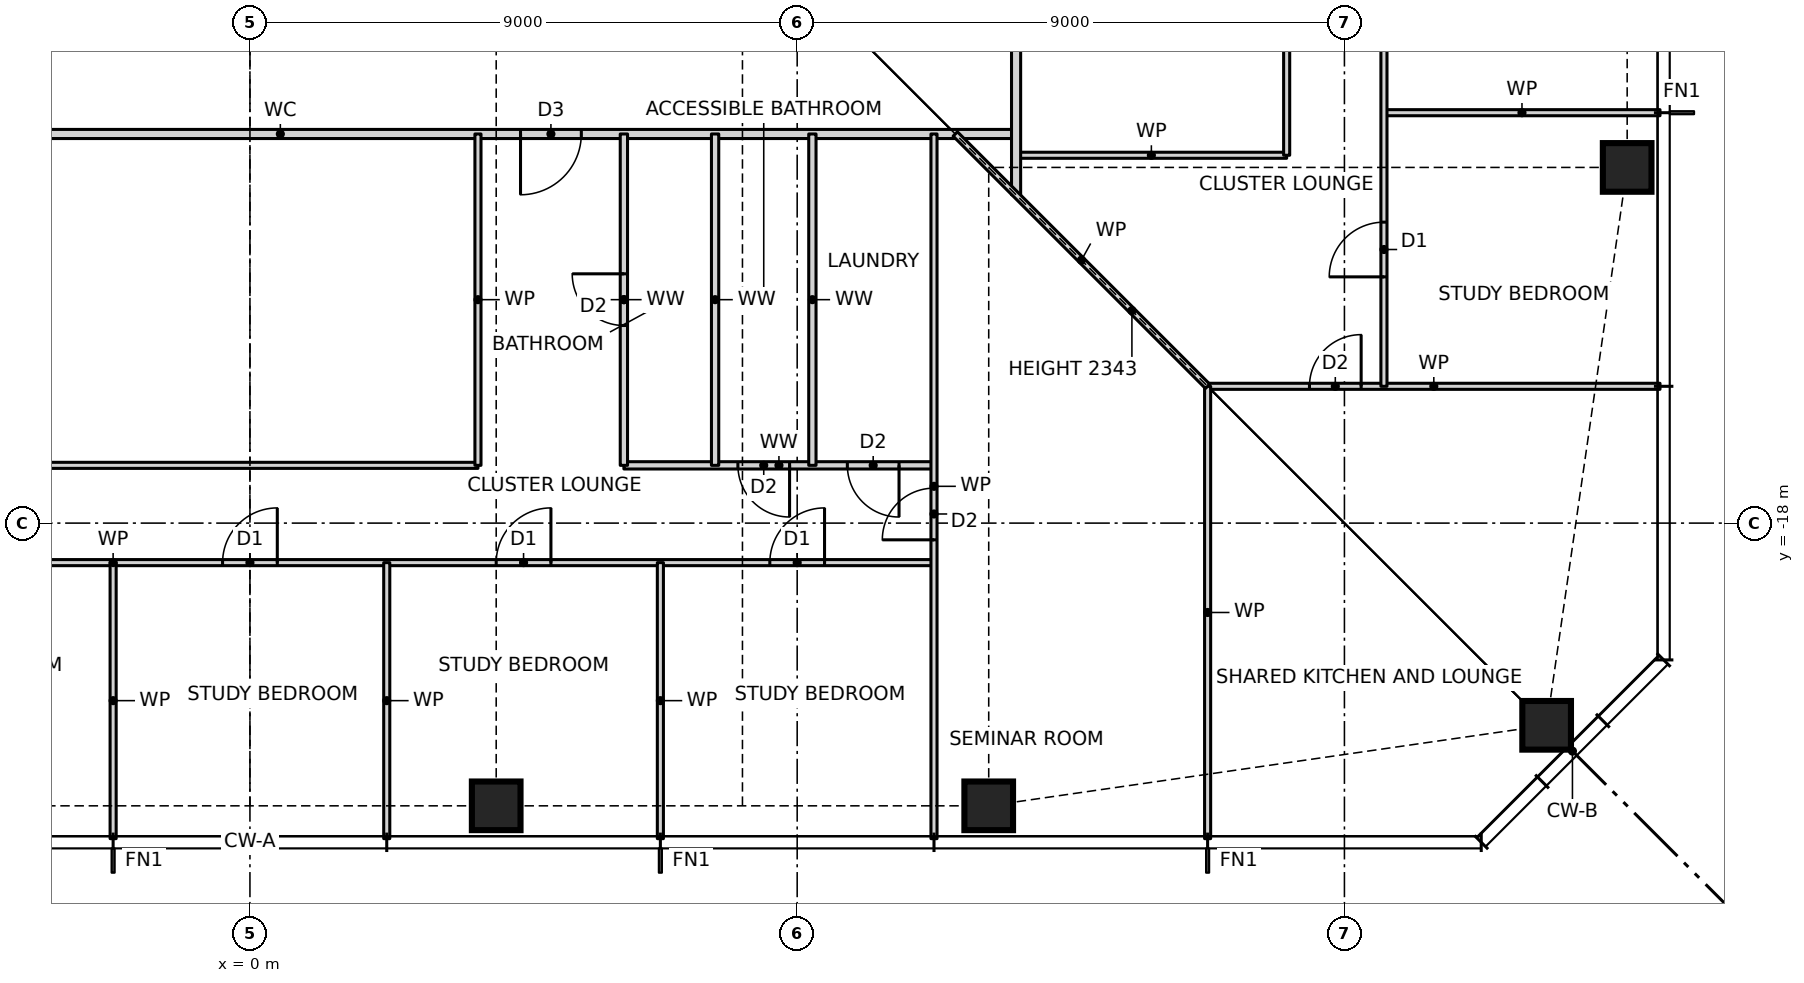
"""IFC4 building model, lengths in metres.
Left out: names, types, materials, properties, quantities, classifications, styles, units other than length and angle.
Written with IfcOpenShell. Run it as: python <this file> out.ifc"""

import sys

from ifc_helpers import new_model, si_unit, direction, frame, frame_2d, origin, origin_2d, place, context, subcontext, project, spatial, rectangle, hollow_rectangle, extrude, element, fill, save


model = new_model("IFC4")
c1 = context("Model", 3, precision=1e-05, world=origin(), true_north=direction((0.0, 1.0)))
c2 = subcontext(c1, "Body", "Model", "MODEL_VIEW")
j1 = project(units=[si_unit("LENGTHUNIT", "METRE"), si_unit("PLANEANGLEUNIT", "RADIAN")], contexts=[c1])
p1 = place(None, origin())
s1 = spatial("IfcSite", under=j1, at=p1, CompositionType="ELEMENT")
p2 = place(p1, origin())
s2 = spatial("IfcBuilding", under=s1, at=p2, CompositionType="ELEMENT")
p3 = place(p2, frame((0.0, 0.0, 25.5)))
s3 = spatial("IfcBuildingStorey", under=s2, at=p3, CompositionType="ELEMENT", Elevation=25.5)
for number, where, z_axis, x_axis in (
    (1, (4.05, -22.65, 0.0), (0.0, 0.0, 1.0), (1.0, 0.0, 0.0)),
    (2, (12.15, -22.65, 0.0), (0.0, 0.0, 1.0), (1.0, 0.0, 0.0)),
    (3, (21.326, -21.326, 0.0), (0.0, 0.0, 1.0), (1.0, 0.0, 0.0)),
    (4, (22.65, -12.15, 0.0), (0.0, 0.0, 1.0), (1.0, 0.0, 0.0)),
):
    element("IfcColumn", number, at=place(p3, frame(where, z_axis=z_axis, x_axis=x_axis)), inside=s3, PredefinedType="COLUMN", context=c2, shape_type="SweptSolid", body=[
        extrude(hollow_rectangle(XDim=0.8, YDim=0.8, WallThickness=0.09, at=origin_2d()), origin(), (0.0, 0.0, 1.0), 3.5),
    ])
p4 = place(p3, frame((-15.75, -18.65, 0.0), z_axis=(0.0, 0.0, 1.0), x_axis=(1.0, 0.0, 0.0)))
e5 = element("IfcWall", 5, at=p4, inside=s3, PredefinedType="PARTITIONING", context=c2, shape_type="SweptSolid", body=[
    extrude(rectangle(XDim=27.0, YDim=0.1, at=frame_2d((13.5, 0.0))), origin(), (0.0, 0.0, 1.0), 3.27),
])
p5 = place(p4, frame((1.8, 0.0, 0.0)))
e6 = element("IfcOpeningElement", 6, at=p5, cuts=e5, PredefinedType="OPENING", context=c2, shape_type="SweptSolid", body=[
    extrude(rectangle(XDim=0.9, YDim=2.1, at=frame_2d((0.45, 1.05))), frame((0.0, 0.06, 0.0), z_axis=(0.0, -1.0, 0.0), x_axis=(1.0, 0.0, 0.0)), (0.0, 0.0, 1.0), 0.12),
])
p6 = place(p4, frame((6.3, 0.0, 0.0)))
e7 = element("IfcOpeningElement", 7, at=p6, cuts=e5, PredefinedType="OPENING", context=c2, shape_type="SweptSolid", body=[
    extrude(rectangle(XDim=0.9, YDim=2.1, at=frame_2d((0.45, 1.05))), frame((0.0, 0.06, 0.0), z_axis=(0.0, -1.0, 0.0), x_axis=(1.0, 0.0, 0.0)), (0.0, 0.0, 1.0), 0.12),
])
p7 = place(p4, frame((10.8, 0.0, 0.0)))
e8 = element("IfcOpeningElement", 8, at=p7, cuts=e5, PredefinedType="OPENING", context=c2, shape_type="SweptSolid", body=[
    extrude(rectangle(XDim=0.9, YDim=2.1, at=frame_2d((0.45, 1.05))), frame((0.0, 0.06, 0.0), z_axis=(0.0, -1.0, 0.0), x_axis=(1.0, 0.0, 0.0)), (0.0, 0.0, 1.0), 0.12),
])
p8 = place(p4, frame((15.3, 0.0, 0.0)))
e9 = element("IfcOpeningElement", 9, at=p8, cuts=e5, PredefinedType="OPENING", context=c2, shape_type="SweptSolid", body=[
    extrude(rectangle(XDim=0.9, YDim=2.1, at=frame_2d((0.45, 1.05))), frame((0.0, 0.06, 0.0), z_axis=(0.0, -1.0, 0.0), x_axis=(1.0, 0.0, 0.0)), (0.0, 0.0, 1.0), 0.12),
])
p9 = place(p4, frame((19.8, 0.0, 0.0)))
e10 = element("IfcOpeningElement", 10, at=p9, cuts=e5, PredefinedType="OPENING", context=c2, shape_type="SweptSolid", body=[
    extrude(rectangle(XDim=0.9, YDim=2.1, at=frame_2d((0.45, 1.05))), frame((0.0, 0.06, 0.0), z_axis=(0.0, -1.0, 0.0), x_axis=(1.0, 0.0, 0.0)), (0.0, 0.0, 1.0), 0.12),
])
p10 = place(p4, frame((24.3, 0.0, 0.0)))
e11 = element("IfcOpeningElement", 11, at=p10, cuts=e5, PredefinedType="OPENING", context=c2, shape_type="SweptSolid", body=[
    extrude(rectangle(XDim=0.9, YDim=2.1, at=frame_2d((0.45, 1.05))), frame((0.0, 0.06, 0.0), z_axis=(0.0, -1.0, 0.0), x_axis=(1.0, 0.0, 0.0)), (0.0, 0.0, 1.0), 0.12),
])
p11 = place(p3, frame((-11.76, -17.05, 0.0), z_axis=(0.0, 0.0, 1.0), x_axis=(1.0, 0.0, 0.0)))
e12 = element("IfcWall", 12, at=p11, inside=s3, PredefinedType="PARTITIONING", context=c2, shape_type="SweptSolid", body=[
    extrude(rectangle(XDim=15.51, YDim=0.1, at=frame_2d((7.755, 0.0))), origin(), (0.0, 0.0, 1.0), 3.27),
])
p12 = place(p11, frame((7.33, 0.0, 0.0)))
e13 = element("IfcOpeningElement", 13, at=p12, cuts=e12, PredefinedType="OPENING", context=c2, shape_type="SweptSolid", body=[
    extrude(rectangle(XDim=0.85, YDim=2.1, at=frame_2d((0.425, 1.05))), frame((0.0, 0.06, 0.0), z_axis=(0.0, -1.0, 0.0), x_axis=(1.0, 0.0, 0.0)), (0.0, 0.0, 1.0), 0.12),
])
p13 = place(p3, frame((6.15, -17.05, 0.0), z_axis=(0.0, 0.0, 1.0), x_axis=(1.0, 0.0, 0.0)))
e14 = element("IfcWall", 14, at=p13, inside=s3, PredefinedType="PARTITIONING", context=c2, shape_type="SweptSolid", body=[
    extrude(rectangle(XDim=5.1, YDim=0.12, at=frame_2d((2.55, 0.0))), origin(), (0.0, 0.0, 1.0), 3.27),
])
p14 = place(p13, frame((1.875, 0.0, 0.0)))
e15 = element("IfcOpeningElement", 15, at=p14, cuts=e14, PredefinedType="OPENING", context=c2, shape_type="SweptSolid", body=[
    extrude(rectangle(XDim=0.85, YDim=2.1, at=frame_2d((0.425, 1.05))), frame((0.0, 0.07, 0.0), z_axis=(0.0, -1.0, 0.0), x_axis=(1.0, 0.0, 0.0)), (0.0, 0.0, 1.0), 0.14),
])
p15 = place(p13, frame((3.675, 0.0, 0.0)))
e16 = element("IfcOpeningElement", 16, at=p15, cuts=e14, PredefinedType="OPENING", context=c2, shape_type="SweptSolid", body=[
    extrude(rectangle(XDim=0.85, YDim=2.1, at=frame_2d((0.425, 1.05))), frame((0.0, 0.07, 0.0), z_axis=(0.0, -1.0, 0.0), x_axis=(1.0, 0.0, 0.0)), (0.0, 0.0, 1.0), 0.14),
])
p16 = place(p3, frame((15.75, -15.75, 0.0), z_axis=(0.0, 0.0, 1.0), x_axis=(1.0, 0.0, 0.0)))
e17 = element("IfcWall", 17, at=p16, inside=s3, PredefinedType="PARTITIONING", context=c2, shape_type="SweptSolid", body=[
    extrude(rectangle(XDim=7.44, YDim=0.1, at=frame_2d((3.72, 0.0))), origin(), (0.0, 0.0, 1.0), 3.27),
])
p17 = place(p16, frame((1.675, 0.0, 0.0)))
e18 = element("IfcOpeningElement", 18, at=p17, cuts=e17, PredefinedType="OPENING", context=c2, shape_type="SweptSolid", body=[
    extrude(rectangle(XDim=0.85, YDim=2.1, at=frame_2d((0.425, 1.05))), frame((0.0, 0.06, 0.0), z_axis=(0.0, -1.0, 0.0), x_axis=(1.0, 0.0, 0.0)), (0.0, 0.0, 1.0), 0.12),
])
p18 = place(p3, frame((12.6, -11.95, 0.0), z_axis=(0.0, 0.0, 1.0), x_axis=(1.0, 0.0, 0.0)))
e19 = element("IfcWall", 19, at=p18, inside=s3, PredefinedType="PARTITIONING", context=c2, shape_type="SweptSolid", body=[
    extrude(rectangle(XDim=4.45, YDim=0.1, at=frame_2d((2.225, 0.0))), origin(), (0.0, 0.0, 1.0), 3.27),
])
p19 = place(p3, frame((-11.6, -11.6, 0.0), z_axis=(0.0, 0.0, 1.0), x_axis=(1.0, 0.0, 0.0)))
e20 = element("IfcWall", 20, at=p19, inside=s3, PredefinedType="PARTITIONING", context=c2, shape_type="SweptSolid", body=[
    extrude(rectangle(XDim=24.2, YDim=0.15, at=frame_2d((12.1, 0.0))), origin(), (0.0, 0.0, 1.0), 3.27),
])
p20 = place(p19, frame((16.05, 0.0, 0.0)))
e21 = element("IfcOpeningElement", 21, at=p20, cuts=e20, PredefinedType="OPENING", context=c2, shape_type="SweptSolid", body=[
    extrude(rectangle(XDim=1.0, YDim=2.1, at=frame_2d((0.5, 1.05))), frame((0.0, 0.085, 0.0), z_axis=(0.0, -1.0, 0.0), x_axis=(1.0, 0.0, 0.0)), (0.0, 0.0, 1.0), 0.17),
])
p21 = place(p3, frame((18.65, -11.25, 0.0), z_axis=(0.0, 0.0, 1.0), x_axis=(1.0, 0.0, 0.0)))
e22 = element("IfcWall", 22, at=p21, inside=s3, PredefinedType="PARTITIONING", context=c2, shape_type="SweptSolid", body=[
    extrude(rectangle(XDim=4.54, YDim=0.1, at=frame_2d((2.27, 0.0))), origin(), (0.0, 0.0, 1.0), 3.27),
])
p22 = place(p3, frame((18.65, -15.75, 0.0), z_axis=(0.0, 0.0, 1.0), x_axis=(0.0, 1.0, 0.0)))
e23 = element("IfcWall", 23, at=p22, inside=s3, PredefinedType="PARTITIONING", context=c2, shape_type="SweptSolid", body=[
    extrude(rectangle(XDim=31.5, YDim=0.1, at=frame_2d((15.75, 0.0))), origin(), (0.0, 0.0, 1.0), 3.27),
])
p23 = place(p22, frame((1.8, 0.0, 0.0)))
e24 = element("IfcOpeningElement", 24, at=p23, cuts=e23, PredefinedType="OPENING", context=c2, shape_type="SweptSolid", body=[
    extrude(rectangle(XDim=0.9, YDim=2.1, at=frame_2d((0.45, 1.05))), frame((0.0, 0.06, 0.0), z_axis=(0.0, -1.0, 0.0), x_axis=(1.0, 0.0, 0.0)), (0.0, 0.0, 1.0), 0.12),
])
p24 = place(p22, frame((6.3, 0.0, 0.0)))
e25 = element("IfcOpeningElement", 25, at=p24, cuts=e23, PredefinedType="OPENING", context=c2, shape_type="SweptSolid", body=[
    extrude(rectangle(XDim=0.9, YDim=2.1, at=frame_2d((0.45, 1.05))), frame((0.0, 0.06, 0.0), z_axis=(0.0, -1.0, 0.0), x_axis=(1.0, 0.0, 0.0)), (0.0, 0.0, 1.0), 0.12),
])
p25 = place(p22, frame((10.8, 0.0, 0.0)))
e26 = element("IfcOpeningElement", 26, at=p25, cuts=e23, PredefinedType="OPENING", context=c2, shape_type="SweptSolid", body=[
    extrude(rectangle(XDim=0.9, YDim=2.1, at=frame_2d((0.45, 1.05))), frame((0.0, 0.06, 0.0), z_axis=(0.0, -1.0, 0.0), x_axis=(1.0, 0.0, 0.0)), (0.0, 0.0, 1.0), 0.12),
])
p26 = place(p22, frame((15.3, 0.0, 0.0)))
e27 = element("IfcOpeningElement", 27, at=p26, cuts=e23, PredefinedType="OPENING", context=c2, shape_type="SweptSolid", body=[
    extrude(rectangle(XDim=0.9, YDim=2.1, at=frame_2d((0.45, 1.05))), frame((0.0, 0.06, 0.0), z_axis=(0.0, -1.0, 0.0), x_axis=(1.0, 0.0, 0.0)), (0.0, 0.0, 1.0), 0.12),
])
p27 = place(p22, frame((19.8, 0.0, 0.0)))
e28 = element("IfcOpeningElement", 28, at=p27, cuts=e23, PredefinedType="OPENING", context=c2, shape_type="SweptSolid", body=[
    extrude(rectangle(XDim=0.9, YDim=2.1, at=frame_2d((0.45, 1.05))), frame((0.0, 0.06, 0.0), z_axis=(0.0, -1.0, 0.0), x_axis=(1.0, 0.0, 0.0)), (0.0, 0.0, 1.0), 0.12),
])
p28 = place(p22, frame((24.3, 0.0, 0.0)))
e29 = element("IfcOpeningElement", 29, at=p28, cuts=e23, PredefinedType="OPENING", context=c2, shape_type="SweptSolid", body=[
    extrude(rectangle(XDim=0.9, YDim=2.1, at=frame_2d((0.45, 1.05))), frame((0.0, 0.06, 0.0), z_axis=(0.0, -1.0, 0.0), x_axis=(1.0, 0.0, 0.0)), (0.0, 0.0, 1.0), 0.12),
])
p29 = place(p22, frame((28.8, 0.0, 0.0)))
e30 = element("IfcOpeningElement", 30, at=p29, cuts=e23, PredefinedType="OPENING", context=c2, shape_type="SweptSolid", body=[
    extrude(rectangle(XDim=0.9, YDim=2.1, at=frame_2d((0.45, 1.05))), frame((0.0, 0.06, 0.0), z_axis=(0.0, -1.0, 0.0), x_axis=(1.0, 0.0, 0.0)), (0.0, 0.0, 1.0), 0.12),
])
p30 = place(p3, frame((17.05, -11.95, 0.0), z_axis=(0.0, 0.0, 1.0), x_axis=(0.0, 1.0, 0.0)))
e31 = element("IfcWall", 31, at=p30, inside=s3, PredefinedType="PARTITIONING", context=c2, shape_type="SweptSolid", body=[
    extrude(rectangle(XDim=20.2, YDim=0.1, at=frame_2d((10.1, 0.0))), origin(), (0.0, 0.0, 1.0), 3.27),
])
p31 = place(p30, frame((9.675, 0.0, 0.0)))
e32 = element("IfcOpeningElement", 32, at=p31, cuts=e31, PredefinedType="OPENING", context=c2, shape_type="SweptSolid", body=[
    extrude(rectangle(XDim=0.85, YDim=2.1, at=frame_2d((0.425, 1.05))), frame((0.0, 0.06, 0.0), z_axis=(0.0, -1.0, 0.0), x_axis=(1.0, 0.0, 0.0)), (0.0, 0.0, 1.0), 0.12),
])
p32 = place(p3, frame((15.75, -23.19, 0.0), z_axis=(0.0, 0.0, 1.0), x_axis=(0.0, 1.0, 0.0)))
e33 = element("IfcWall", 33, at=p32, inside=s3, PredefinedType="PARTITIONING", context=c2, shape_type="SweptSolid", body=[
    extrude(rectangle(XDim=7.44, YDim=0.1, at=frame_2d((3.72, 0.0))), origin(), (0.0, 0.0, 1.0), 3.27),
])
p33 = place(p3, frame((12.6, -12.6, 0.0), z_axis=(0.0, 0.0, 1.0), x_axis=(0.0, 1.0, 0.0)))
e34 = element("IfcWall", 34, at=p33, inside=s3, PredefinedType="PARTITIONING", context=c2, shape_type="SweptSolid", body=[
    extrude(rectangle(XDim=25.2, YDim=0.15, at=frame_2d((12.6, 0.0))), origin(), (0.0, 0.0, 1.0), 3.27),
])
p34 = place(p33, frame((21.55, 0.0, 0.0)))
e35 = element("IfcOpeningElement", 35, at=p34, cuts=e34, PredefinedType="OPENING", context=c2, shape_type="SweptSolid", body=[
    extrude(rectangle(XDim=1.0, YDim=2.1, at=frame_2d((0.5, 1.05))), frame((0.0, 0.085, 0.0), z_axis=(0.0, -1.0, 0.0), x_axis=(1.0, 0.0, 0.0)), (0.0, 0.0, 1.0), 0.17),
])
p35 = place(p3, frame((11.25, -23.19, 0.0), z_axis=(0.0, 0.0, 1.0), x_axis=(0.0, 1.0, 0.0)))
e36 = element("IfcWall", 36, at=p35, inside=s3, PredefinedType="PARTITIONING", context=c2, shape_type="SweptSolid", body=[
    extrude(rectangle(XDim=11.59, YDim=0.1, at=frame_2d((5.795, 0.0))), origin(), (0.0, 0.0, 1.0), 3.27),
])
p36 = place(p35, frame((4.915, 0.0, 0.0)))
e37 = element("IfcOpeningElement", 37, at=p36, cuts=e36, PredefinedType="OPENING", context=c2, shape_type="SweptSolid", body=[
    extrude(rectangle(XDim=0.85, YDim=2.1, at=frame_2d((0.425, 1.05))), frame((0.0, 0.06, 0.0), z_axis=(0.0, -1.0, 0.0), x_axis=(1.0, 0.0, 0.0)), (0.0, 0.0, 1.0), 0.12),
])
for number, where, z_axis, x_axis in (
    (38, (9.25, -17.05, 0.0), (0.0, 0.0, 1.0), (0.0, 1.0, 0.0)),
    (39, (7.65, -17.05, 0.0), (0.0, 0.0, 1.0), (0.0, 1.0, 0.0)),
):
    element("IfcWall", number, at=place(p3, frame(where, z_axis=z_axis, x_axis=x_axis)), inside=s3, PredefinedType="PARTITIONING", context=c2, shape_type="SweptSolid", body=[
        extrude(rectangle(XDim=5.45, YDim=0.12, at=frame_2d((2.725, 0.0))), origin(), (0.0, 0.0, 1.0), 3.27),
    ])
p37 = place(p3, frame((6.75, -23.19, 0.0), z_axis=(0.0, 0.0, 1.0), x_axis=(0.0, 1.0, 0.0)))
e40 = element("IfcWall", 40, at=p37, inside=s3, PredefinedType="PARTITIONING", context=c2, shape_type="SweptSolid", body=[
    extrude(rectangle(XDim=4.54, YDim=0.1, at=frame_2d((2.27, 0.0))), origin(), (0.0, 0.0, 1.0), 3.27),
])
p38 = place(p3, frame((6.15, -17.05, 0.0), z_axis=(0.0, 0.0, 1.0), x_axis=(0.0, 1.0, 0.0)))
e41 = element("IfcWall", 41, at=p38, inside=s3, PredefinedType="PARTITIONING", context=c2, shape_type="SweptSolid", body=[
    extrude(rectangle(XDim=5.45, YDim=0.12, at=frame_2d((2.725, 0.0))), origin(), (0.0, 0.0, 1.0), 3.27),
])
p39 = place(p38, frame((2.3, 0.0, 0.0)))
e42 = element("IfcOpeningElement", 42, at=p39, cuts=e41, PredefinedType="OPENING", context=c2, shape_type="SweptSolid", body=[
    extrude(rectangle(XDim=0.85, YDim=2.1, at=frame_2d((0.425, 1.05))), frame((0.0, 0.07, 0.0), z_axis=(0.0, -1.0, 0.0), x_axis=(1.0, 0.0, 0.0)), (0.0, 0.0, 1.0), 0.14),
])
p40 = place(p3, frame((3.75, -17.05, 0.0), z_axis=(0.0, 0.0, 1.0), x_axis=(0.0, 1.0, 0.0)))
e43 = element("IfcWall", 43, at=p40, inside=s3, PredefinedType="PARTITIONING", context=c2, shape_type="SweptSolid", body=[
    extrude(rectangle(XDim=5.45, YDim=0.1, at=frame_2d((2.725, 0.0))), origin(), (0.0, 0.0, 1.0), 3.27),
])
for number, where, z_axis, x_axis in (
    (44, (2.25, -23.19, 0.0), (0.0, 0.0, 1.0), (0.0, 1.0, 0.0)),
    (45, (-2.25, -23.19, 0.0), (0.0, 0.0, 1.0), (0.0, 1.0, 0.0)),
):
    element("IfcWall", number, at=place(p3, frame(where, z_axis=z_axis, x_axis=x_axis)), inside=s3, PredefinedType="PARTITIONING", context=c2, shape_type="SweptSolid", body=[
        extrude(rectangle(XDim=4.54, YDim=0.1, at=frame_2d((2.27, 0.0))), origin(), (0.0, 0.0, 1.0), 3.27),
    ])
p41 = place(p3, frame((15.75, -15.75, 0.0), z_axis=(0.0, 0.0, 1.0), x_axis=(-0.707106781187, 0.707106781187, 0.0)))
e46 = element("IfcWall", 46, at=p41, inside=s3, PredefinedType="PARTITIONING", context=c2, shape_type="SweptSolid", body=[
    extrude(rectangle(XDim=5.869, YDim=0.1, at=frame_2d((2.935, 0.0))), origin(), (0.0, 0.0, 1.0), 2.343),
])
p42 = place(p8, origin())
e47 = element("IfcDoor", 47, at=p42, inside=s3, OperationType="SINGLE_SWING_RIGHT", PredefinedType="DOOR", context=c2, shape_type="SweptSolid", body=[
    extrude(rectangle(XDim=0.9, YDim=2.1, at=frame_2d((0.45, 1.05))), frame((0.0, 0.025, 0.0), z_axis=(0.0, -1.0, 0.0), x_axis=(1.0, 0.0, 0.0)), (0.0, 0.0, 1.0), 0.05),
])
fill(e9, e47)
p43 = place(p9, origin())
e48 = element("IfcDoor", 48, at=p43, inside=s3, OperationType="SINGLE_SWING_RIGHT", PredefinedType="DOOR", context=c2, shape_type="SweptSolid", body=[
    extrude(rectangle(XDim=0.9, YDim=2.1, at=frame_2d((0.45, 1.05))), frame((0.0, 0.025, 0.0), z_axis=(0.0, -1.0, 0.0), x_axis=(1.0, 0.0, 0.0)), (0.0, 0.0, 1.0), 0.05),
])
fill(e10, e48)
p44 = place(p10, origin())
e49 = element("IfcDoor", 49, at=p44, inside=s3, OperationType="SINGLE_SWING_RIGHT", PredefinedType="DOOR", context=c2, shape_type="SweptSolid", body=[
    extrude(rectangle(XDim=0.9, YDim=2.1, at=frame_2d((0.45, 1.05))), frame((0.0, 0.025, 0.0), z_axis=(0.0, -1.0, 0.0), x_axis=(1.0, 0.0, 0.0)), (0.0, 0.0, 1.0), 0.05),
])
fill(e11, e49)
p45 = place(p20, frame((1.0, 0.0, 0.0), z_axis=(0.0, 0.0, 1.0), x_axis=(-1.0, 0.0, 0.0)))
e50 = element("IfcDoor", 50, at=p45, inside=s3, OperationType="SINGLE_SWING_RIGHT", PredefinedType="DOOR", context=c2, shape_type="SweptSolid", body=[
    extrude(rectangle(XDim=1.0, YDim=2.1, at=frame_2d((0.5, 1.05))), frame((0.0, 0.025, 0.0), z_axis=(0.0, -1.0, 0.0), x_axis=(1.0, 0.0, 0.0)), (0.0, 0.0, 1.0), 0.05),
])
fill(e21, e50)
p46 = place(p39, origin())
e51 = element("IfcDoor", 51, at=p46, inside=s3, OperationType="SINGLE_SWING_RIGHT", PredefinedType="DOOR", context=c2, shape_type="SweptSolid", body=[
    extrude(rectangle(XDim=0.85, YDim=2.1, at=frame_2d((0.425, 1.05))), frame((0.0, 0.025, 0.0), z_axis=(0.0, -1.0, 0.0), x_axis=(1.0, 0.0, 0.0)), (0.0, 0.0, 1.0), 0.05),
])
fill(e42, e51)
p47 = place(p14, frame((0.85, 0.0, 0.0), z_axis=(0.0, 0.0, 1.0), x_axis=(-1.0, 0.0, 0.0)))
e52 = element("IfcDoor", 52, at=p47, inside=s3, OperationType="SINGLE_SWING_LEFT", PredefinedType="DOOR", context=c2, shape_type="SweptSolid", body=[
    extrude(rectangle(XDim=0.85, YDim=2.1, at=frame_2d((0.425, 1.05))), frame((0.0, 0.025, 0.0), z_axis=(0.0, -1.0, 0.0), x_axis=(1.0, 0.0, 0.0)), (0.0, 0.0, 1.0), 0.05),
])
fill(e15, e52)
p48 = place(p15, frame((0.85, 0.0, 0.0), z_axis=(0.0, 0.0, 1.0), x_axis=(-1.0, 0.0, 0.0)))
e53 = element("IfcDoor", 53, at=p48, inside=s3, OperationType="SINGLE_SWING_LEFT", PredefinedType="DOOR", context=c2, shape_type="SweptSolid", body=[
    extrude(rectangle(XDim=0.85, YDim=2.1, at=frame_2d((0.425, 1.05))), frame((0.0, 0.025, 0.0), z_axis=(0.0, -1.0, 0.0), x_axis=(1.0, 0.0, 0.0)), (0.0, 0.0, 1.0), 0.05),
])
fill(e16, e53)
p49 = place(p36, origin())
e54 = element("IfcDoor", 54, at=p49, inside=s3, OperationType="SINGLE_SWING_LEFT", PredefinedType="DOOR", context=c2, shape_type="SweptSolid", body=[
    extrude(rectangle(XDim=0.85, YDim=2.1, at=frame_2d((0.425, 1.05))), frame((0.0, 0.025, 0.0), z_axis=(0.0, -1.0, 0.0), x_axis=(1.0, 0.0, 0.0)), (0.0, 0.0, 1.0), 0.05),
])
fill(e37, e54)
p50 = place(p23, origin())
e55 = element("IfcDoor", 55, at=p50, inside=s3, OperationType="SINGLE_SWING_LEFT", PredefinedType="DOOR", context=c2, shape_type="SweptSolid", body=[
    extrude(rectangle(XDim=0.9, YDim=2.1, at=frame_2d((0.45, 1.05))), frame((0.0, 0.025, 0.0), z_axis=(0.0, -1.0, 0.0), x_axis=(1.0, 0.0, 0.0)), (0.0, 0.0, 1.0), 0.05),
])
fill(e24, e55)
p51 = place(p17, origin())
e56 = element("IfcDoor", 56, at=p51, inside=s3, OperationType="SINGLE_SWING_RIGHT", PredefinedType="DOOR", context=c2, shape_type="SweptSolid", body=[
    extrude(rectangle(XDim=0.85, YDim=2.1, at=frame_2d((0.425, 1.05))), frame((0.0, 0.025, 0.0), z_axis=(0.0, -1.0, 0.0), x_axis=(1.0, 0.0, 0.0)), (0.0, 0.0, 1.0), 0.05),
])
fill(e18, e56)
save(model, sys.argv[1])
